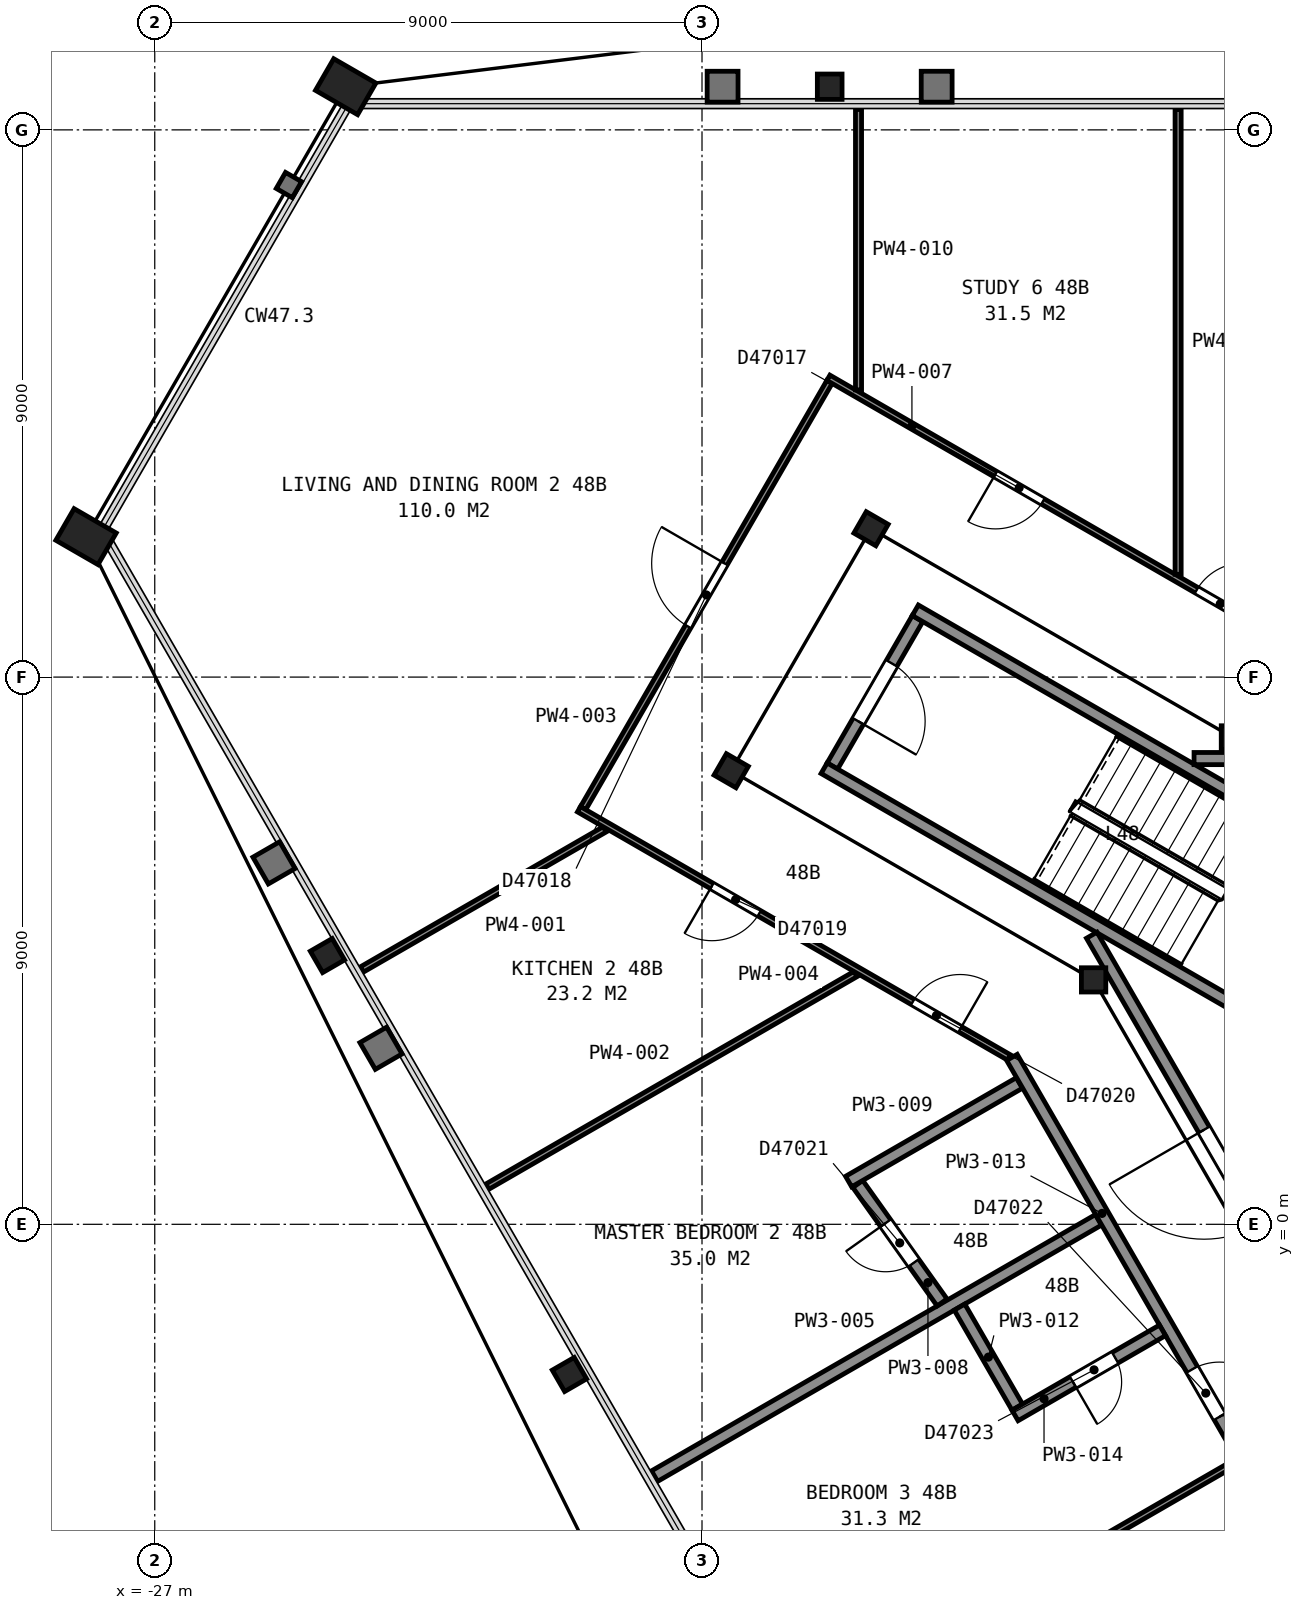
"""IFC4 building model, lengths in metres.
Left out: names, types, materials, properties, quantities, classifications, styles, units other than length and angle.
Written with IfcOpenShell. Run it as: python <this file> out.ifc"""

import sys

from ifc_helpers import new_model, si_unit, direction, frame, frame_2d, origin, origin_2d, place, context, subcontext, project, spatial, rectangle, hollow_rectangle, i_section, extrude, element, fill, save


model = new_model("IFC4")
c1 = context("Model", 3, precision=1e-05, world=origin(), true_north=direction((0.0, 1.0)))
c2 = subcontext(c1, "Body", "Model", "MODEL_VIEW")
j1 = project(units=[si_unit("LENGTHUNIT", "METRE"), si_unit("PLANEANGLEUNIT", "RADIAN")], contexts=[c1])
p1 = place(None, origin())
s1 = spatial("IfcSite", under=j1, at=p1, CompositionType="ELEMENT")
p2 = place(p1, origin())
s2 = spatial("IfcBuilding", under=s1, at=p2, CompositionType="ELEMENT")
p3 = place(p2, frame((0.0, 0.0, 193.2)))
s3 = spatial("IfcBuildingStorey", under=s2, at=p3, CompositionType="ELEMENT", Elevation=193.2)
p4 = place(p3, frame((-15.9, 18.71, 0.0), z_axis=(0.0, 0.0, 1.0), x_axis=(1.0, 0.0, 0.0)))
e1 = element("IfcColumn", 1, at=p4, inside=s3, PredefinedType="COLUMN", context=c2, shape_type="SweptSolid", body=[
    extrude(i_section(OverallWidth=0.406, OverallDepth=0.417, WebThickness=0.03, FlangeThickness=0.048, FilletRadius=0.015, at=origin_2d()), origin(), (0.0, 0.0, 1.0), 3.7),
])
for number, where, z_axis, x_axis in (
    (2, (-23.86, 18.71, 0.0), (0.0, 0.0, 1.0), (0.5, 0.866, 0.0)),
    (3, (-28.13, 11.31, 0.0), (0.0, 0.0, 1.0), (0.5, 0.866, 0.0)),
):
    element("IfcColumn", number, at=place(p3, frame(where, z_axis=z_axis, x_axis=x_axis)), inside=s3, PredefinedType="COLUMN", context=c2, shape_type="SweptSolid", body=[
        extrude(hollow_rectangle(XDim=0.6, YDim=0.8, WallThickness=0.05, at=origin_2d()), origin(), (0.0, 0.0, 1.0), 3.7),
    ])
for number, where, z_axis, x_axis in (
    (4, (-24.16, 4.42, 0.0), (0.0, 0.0, 1.0), (-0.5, 0.866, 0.0)),
    (5, (-20.18, -2.47, 0.0), (0.0, 0.0, 1.0), (-0.5, 0.866, 0.0)),
):
    element("IfcColumn", number, at=place(p3, frame(where, z_axis=z_axis, x_axis=x_axis)), inside=s3, PredefinedType="COLUMN", context=c2, shape_type="SweptSolid", body=[
        extrude(i_section(OverallWidth=0.406, OverallDepth=0.417, WebThickness=0.03, FlangeThickness=0.048, FilletRadius=0.015, at=origin_2d()), origin(), (0.0, 0.0, 1.0), 3.7),
    ])
p5 = place(p3, frame((-9.26, 8.0, 0.0), z_axis=(0.0, 0.0, 1.0), x_axis=(1.0, 0.0, 0.0)))
e6 = element("IfcColumn", 6, at=p5, inside=s3, PredefinedType="COLUMN", context=c2, shape_type="SweptSolid", body=[
    extrude(i_section(OverallWidth=0.401, OverallDepth=0.399, WebThickness=0.025, FlangeThickness=0.04, FilletRadius=0.015, at=origin_2d()), origin(), (0.0, 0.0, 1.0), 3.7),
])
for number, where, z_axis, x_axis in (
    (7, (-15.22, 11.44, 0.0), (0.0, 0.0, 1.0), (0.5, 0.866, 0.0)),
    (8, (-17.52, 7.46, 0.0), (0.0, 0.0, 1.0), (0.5, 0.866, 0.0)),
):
    element("IfcColumn", number, at=place(p3, frame(where, z_axis=z_axis, x_axis=x_axis)), inside=s3, PredefinedType="COLUMN", context=c2, shape_type="SweptSolid", body=[
        extrude(i_section(OverallWidth=0.406, OverallDepth=0.417, WebThickness=0.03, FlangeThickness=0.048, FilletRadius=0.015, at=origin_2d()), origin(), (0.0, 0.0, 1.0), 3.7),
    ])
p6 = place(p3, frame((-11.56, 4.02, 0.0), z_axis=(0.0, 0.0, 1.0), x_axis=(1.0, 0.0, 0.0)))
e9 = element("IfcColumn", 9, at=p6, inside=s3, PredefinedType="COLUMN", context=c2, shape_type="SweptSolid", body=[
    extrude(i_section(OverallWidth=0.401, OverallDepth=0.399, WebThickness=0.025, FlangeThickness=0.04, FilletRadius=0.015, at=origin_2d()), origin(), (0.0, 0.0, 1.0), 3.7),
])
p7 = place(p3, frame((-14.455, 9.962, 0.0), z_axis=(0.0, 0.0, 1.0), x_axis=(-0.500049511043, -0.865996816683, 0.0)))
e10 = element("IfcWall", 10, at=p7, inside=s3, PredefinedType="PARTITIONING", context=c2, shape_type="SweptSolid", body=[
    extrude(rectangle(XDim=2.8, YDim=0.2, at=frame_2d((1.4, 0.0))), origin(), (0.0, 0.0, 1.0), 3.45),
])
p8 = place(p7, frame((0.85, 0.0, 0.0)))
e11 = element("IfcOpeningElement", 11, at=p8, cuts=e10, PredefinedType="OPENING", context=c2, shape_type="SweptSolid", body=[
    extrude(rectangle(XDim=1.1, YDim=2.1, at=frame_2d((0.55, 1.05))), frame((0.0, 0.11, 0.0), z_axis=(0.0, -1.0, 0.0), x_axis=(1.0, 0.0, 0.0)), (0.0, 0.0, 1.0), 0.22),
])
for number, where, z_axis, x_axis in (
    (12, (-7.678, 2.701, 0.0), (0.0, 0.0, 1.0), (-0.866, 0.5, 0.0)),
    (13, (-6.178, 5.299, 0.0), (0.0, 0.0, 1.0), (-0.866, 0.5, 0.0)),
):
    element("IfcWall", number, at=place(p3, frame(where, z_axis=z_axis, x_axis=x_axis)), inside=s3, PredefinedType="PARTITIONING", context=c2, shape_type="SweptSolid", body=[
        extrude(rectangle(XDim=9.6, YDim=0.2, at=frame_2d((4.8, 0.0))), origin(), (0.0, 0.0, 1.0), 3.45),
    ])
p9 = place(p3, frame((-11.591, 4.755, 0.0), z_axis=(0.0, 0.0, 1.0), x_axis=(0.500043977787, -0.866000011708, 0.0)))
e14 = element("IfcWall", 14, at=p9, inside=s3, PredefinedType="PARTITIONING", context=c2, shape_type="SweptSolid", body=[
    extrude(rectangle(XDim=6.617, YDim=0.2, at=frame_2d((3.308, 0.0))), origin(), (0.0, 0.0, 1.0), 3.45),
])
p10 = place(p9, frame((3.695, 0.0, 0.0)))
e15 = element("IfcOpeningElement", 15, at=p10, cuts=e14, PredefinedType="OPENING", context=c2, shape_type="SweptSolid", body=[
    extrude(rectangle(XDim=1.8, YDim=2.1, at=frame_2d((0.9, 1.05))), frame((0.0, 0.11, 0.0), z_axis=(0.0, -1.0, 0.0), x_axis=(1.0, 0.0, 0.0)), (0.0, 0.0, 1.0), 0.22),
])
p11 = place(p3, frame((-9.908, 7.66, 0.0), z_axis=(0.0, 0.0, 1.0), x_axis=(1.0, 0.0, 0.0)))
e16 = element("IfcWall", 16, at=p11, inside=s3, PredefinedType="PARTITIONING", context=c2, shape_type="SweptSolid", body=[
    extrude(rectangle(XDim=3.621, YDim=0.2, at=frame_2d((1.811, 0.0))), origin(), (0.0, 0.0, 1.0), 3.45),
])
p12 = place(p3, frame((-23.592, 4.192, 0.0), z_axis=(0.0, 0.0, 1.0), x_axis=(0.866056775574, 0.499945658529, 0.0)))
e17 = element("IfcWall", 17, at=p12, inside=s3, PredefinedType="PARTITIONING", context=c2, shape_type="SweptSolid", body=[
    extrude(rectangle(XDim=4.608, YDim=0.1, at=frame_2d((2.304, 0.0))), origin(), (0.0, 0.0, 1.0), 2.713),
])
p13 = place(p3, frame((-21.53, 0.62, 0.0), z_axis=(0.0, 0.0, 1.0), x_axis=(0.865986079307, 0.500068105808, 0.0)))
e18 = element("IfcWall", 18, at=p13, inside=s3, PredefinedType="PARTITIONING", context=c2, shape_type="SweptSolid", body=[
    extrude(rectangle(XDim=6.99, YDim=0.1, at=frame_2d((3.495, 0.0))), origin(), (0.0, 0.0, 1.0), 2.713),
])
p14 = place(p3, frame((-19.955, 6.844, 0.0), z_axis=(0.0, 0.0, 1.0), x_axis=(0.500415732313, 0.865785247537, 0.0)))
e19 = element("IfcWall", 19, at=p14, inside=s3, PredefinedType="PARTITIONING", context=c2, shape_type="SweptSolid", body=[
    extrude(rectangle(XDim=8.097, YDim=0.1, at=frame_2d((4.049, 0.0))), origin(), (0.0, 0.0, 1.0), 2.713),
])
p15 = place(p14, frame((3.45, 0.0, 0.0)))
e20 = element("IfcOpeningElement", 20, at=p15, cuts=e19, PredefinedType="OPENING", context=c2, shape_type="SweptSolid", body=[
    extrude(rectangle(XDim=1.2, YDim=2.1, at=frame_2d((0.6, 1.05))), frame((0.0, 0.06, 0.0), z_axis=(0.0, -1.0, 0.0), x_axis=(1.0, 0.0, 0.0)), (0.0, 0.0, 1.0), 0.12),
])
p16 = place(p3, frame((-12.952, 2.744, 0.0), z_axis=(0.0, 0.0, 1.0), x_axis=(-0.86608949446, 0.499888975259, 0.0)))
e21 = element("IfcWall", 21, at=p16, inside=s3, PredefinedType="PARTITIONING", context=c2, shape_type="SweptSolid", body=[
    extrude(rectangle(XDim=8.165, YDim=0.1, at=frame_2d((4.083, 0.0))), origin(), (0.0, 0.0, 1.0), 2.713),
])
p17 = place(p16, frame((4.741, 0.0, 0.0)))
e22 = element("IfcOpeningElement", 22, at=p17, cuts=e21, PredefinedType="OPENING", context=c2, shape_type="SweptSolid", body=[
    extrude(rectangle(XDim=0.9, YDim=2.1, at=frame_2d((0.45, 1.05))), frame((0.0, 0.06, 0.0), z_axis=(0.0, -1.0, 0.0), x_axis=(1.0, 0.0, 0.0)), (0.0, 0.0, 1.0), 0.12),
])
p18 = place(p16, frame((0.928, 0.0, 0.0)))
e23 = element("IfcOpeningElement", 23, at=p18, cuts=e21, PredefinedType="OPENING", context=c2, shape_type="SweptSolid", body=[
    extrude(rectangle(XDim=0.9, YDim=2.1, at=frame_2d((0.45, 1.05))), frame((0.0, 0.06, 0.0), z_axis=(0.0, -1.0, 0.0), x_axis=(1.0, 0.0, 0.0)), (0.0, 0.0, 1.0), 0.12),
])
p19 = place(p3, frame((-18.78, -4.142, 0.0), z_axis=(0.0, 0.0, 1.0), x_axis=(0.866020616849, 0.500008291124, 0.0)))
e24 = element("IfcWall", 24, at=p19, inside=s3, PredefinedType="PARTITIONING", context=c2, shape_type="SweptSolid", body=[
    extrude(rectangle(XDim=8.428, YDim=0.2, at=frame_2d((4.214, 0.0))), origin(), (0.0, 0.0, 1.0), 2.713),
])
p20 = place(p3, frame((-16.489, -8.11, 0.0), z_axis=(0.0, 0.0, 1.0), x_axis=(0.865995531057, 0.500051737513, 0.0)))
e25 = element("IfcWall", 25, at=p20, inside=s3, PredefinedType="PARTITIONING", context=c2, shape_type="SweptSolid", body=[
    extrude(rectangle(XDim=8.429, YDim=0.1, at=frame_2d((4.214, 0.0))), origin(), (0.0, 0.0, 1.0), 2.713),
])
p21 = place(p3, frame((-15.921, 13.923, 0.0), z_axis=(0.0, 0.0, 1.0), x_axis=(0.866088973199, -0.499889878377, 0.0)))
e26 = element("IfcWall", 26, at=p21, inside=s3, PredefinedType="PARTITIONING", context=c2, shape_type="SweptSolid", body=[
    extrude(rectangle(XDim=8.163, YDim=0.1, at=frame_2d((4.082, 0.0))), origin(), (0.0, 0.0, 1.0), 2.713),
])
p22 = place(p21, frame((6.99, 0.0, 0.0)))
e27 = element("IfcOpeningElement", 27, at=p22, cuts=e26, PredefinedType="OPENING", context=c2, shape_type="SweptSolid", body=[
    extrude(rectangle(XDim=0.9, YDim=2.1, at=frame_2d((0.45, 1.05))), frame((0.0, 0.06, 0.0), z_axis=(0.0, -1.0, 0.0), x_axis=(1.0, 0.0, 0.0)), (0.0, 0.0, 1.0), 0.12),
])
p23 = place(p21, frame((3.172, 0.0, 0.0)))
e28 = element("IfcOpeningElement", 28, at=p23, cuts=e26, PredefinedType="OPENING", context=c2, shape_type="SweptSolid", body=[
    extrude(rectangle(XDim=0.9, YDim=2.1, at=frame_2d((0.45, 1.05))), frame((0.0, 0.06, 0.0), z_axis=(0.0, -1.0, 0.0), x_axis=(1.0, 0.0, 0.0)), (0.0, 0.0, 1.0), 0.12),
])
p24 = place(p3, frame((-15.438, 0.663, 0.0), z_axis=(0.0, 0.0, 1.0), x_axis=(0.579721135961, -0.81481495109, 0.0)))
e29 = element("IfcWall", 29, at=p24, inside=s3, PredefinedType="PARTITIONING", context=c2, shape_type="SweptSolid", body=[
    extrude(rectangle(XDim=2.392, YDim=0.2, at=frame_2d((1.196, 0.0))), origin(), (0.0, 0.0, 1.0), 2.713),
])
p25 = place(p24, frame((0.79, 0.0, 0.0)))
e30 = element("IfcOpeningElement", 30, at=p25, cuts=e29, PredefinedType="OPENING", context=c2, shape_type="SweptSolid", body=[
    extrude(rectangle(XDim=0.8, YDim=2.1, at=frame_2d((0.4, 1.05))), frame((0.0, 0.11, 0.0), z_axis=(0.0, -1.0, 0.0), x_axis=(1.0, 0.0, 0.0)), (0.0, 0.0, 1.0), 0.22),
])
p26 = place(p3, frame((-15.589, 0.703, 0.0), z_axis=(0.0, 0.0, 1.0), x_axis=(0.86594479446, 0.500139593461, 0.0)))
e31 = element("IfcWall", 31, at=p26, inside=s3, PredefinedType="PARTITIONING", context=c2, shape_type="SweptSolid", body=[
    extrude(rectangle(XDim=3.242, YDim=0.2, at=frame_2d((1.621, 0.0))), origin(), (0.0, 0.0, 1.0), 2.713),
])
p27 = place(p3, frame((-15.426, 13.724, 0.0), z_axis=(0.0, 0.0, 1.0), x_axis=(0.0, 1.0, 0.0)))
e32 = element("IfcWall", 32, at=p27, inside=s3, PredefinedType="PARTITIONING", context=c2, shape_type="SweptSolid", body=[
    extrude(rectangle(XDim=4.611, YDim=0.1, at=frame_2d((2.306, 0.0))), origin(), (0.0, 0.0, 1.0), 2.713),
])
p28 = place(p3, frame((-13.765, -1.362, 0.0), z_axis=(0.0, 0.0, 1.0), x_axis=(0.499911523785, -0.866076479525, 0.0)))
e33 = element("IfcWall", 33, at=p28, inside=s3, PredefinedType="PARTITIONING", context=c2, shape_type="SweptSolid", body=[
    extrude(rectangle(XDim=1.9, YDim=0.2, at=frame_2d((0.95, 0.0))), origin(), (0.0, 0.0, 1.0), 2.713),
])
p29 = place(p3, frame((-4.075, -12.545, 0.0), z_axis=(0.0, 0.0, 1.0), x_axis=(-0.499999743747, 0.866025551732, 0.0)))
e34 = element("IfcWall", 34, at=p29, inside=s3, PredefinedType="PARTITIONING", context=c2, shape_type="SweptSolid", body=[
    extrude(rectangle(XDim=17.656, YDim=0.2, at=frame_2d((8.828, 0.0))), origin(), (0.0, 0.0, 1.0), 2.713),
])
p30 = place(p29, frame((10.83, 0.0, 0.0)))
e35 = element("IfcOpeningElement", 35, at=p30, cuts=e34, PredefinedType="OPENING", context=c2, shape_type="SweptSolid", body=[
    extrude(rectangle(XDim=0.9, YDim=2.1, at=frame_2d((0.45, 1.05))), frame((0.0, 0.11, 0.0), z_axis=(0.0, -1.0, 0.0), x_axis=(1.0, 0.0, 0.0)), (0.0, 0.0, 1.0), 0.22),
])
p31 = place(p29, frame((7.148, 0.0, 0.0)))
e36 = element("IfcOpeningElement", 36, at=p31, cuts=e34, PredefinedType="OPENING", context=c2, shape_type="SweptSolid", body=[
    extrude(rectangle(XDim=0.9, YDim=2.1, at=frame_2d((0.45, 1.05))), frame((0.0, 0.11, 0.0), z_axis=(0.0, -1.0, 0.0), x_axis=(1.0, 0.0, 0.0)), (0.0, 0.0, 1.0), 0.22),
])
p32 = place(p29, frame((2.198, 0.0, 0.0)))
e37 = element("IfcOpeningElement", 37, at=p32, cuts=e34, PredefinedType="OPENING", context=c2, shape_type="SweptSolid", body=[
    extrude(rectangle(XDim=0.9, YDim=2.1, at=frame_2d((0.45, 1.05))), frame((0.0, 0.11, 0.0), z_axis=(0.0, -1.0, 0.0), x_axis=(1.0, 0.0, 0.0)), (0.0, 0.0, 1.0), 0.22),
])
p33 = place(p3, frame((-12.852, -3.144, 0.0), z_axis=(0.0, 0.0, 1.0), x_axis=(0.866018616679, 0.500011755427, 0.0)))
e38 = element("IfcWall", 38, at=p33, inside=s3, PredefinedType="PARTITIONING", context=c2, shape_type="SweptSolid", body=[
    extrude(rectangle(XDim=2.8, YDim=0.2, at=frame_2d((1.4, 0.0))), origin(), (0.0, 0.0, 1.0), 2.713),
])
p34 = place(p33, frame((1.1, 0.0, 0.0)))
e39 = element("IfcOpeningElement", 39, at=p34, cuts=e38, PredefinedType="OPENING", context=c2, shape_type="SweptSolid", body=[
    extrude(rectangle(XDim=0.8, YDim=2.1, at=frame_2d((0.4, 1.05))), frame((0.0, 0.11, 0.0), z_axis=(0.0, -1.0, 0.0), x_axis=(1.0, 0.0, 0.0)), (0.0, 0.0, 1.0), 0.22),
])
p35 = place(p3, frame((-10.17, 10.691, 0.0), z_axis=(0.0, 0.0, 1.0), x_axis=(0.0, 1.0, 0.0)))
e40 = element("IfcWall", 40, at=p35, inside=s3, PredefinedType="PARTITIONING", context=c2, shape_type="SweptSolid", body=[
    extrude(rectangle(XDim=7.644, YDim=0.1, at=frame_2d((3.822, 0.0))), origin(), (0.0, 0.0, 1.0), 2.713),
])
p36 = place(p8, origin())
e41 = element("IfcDoor", 41, at=p36, inside=s3, OperationType="SINGLE_SWING_RIGHT", PredefinedType="DOOR", context=c2, shape_type="SweptSolid", body=[
    extrude(rectangle(XDim=1.1, YDim=2.1, at=frame_2d((0.55, 1.05))), frame((0.0, 0.025, 0.0), z_axis=(0.0, -1.0, 0.0), x_axis=(1.0, 0.0, 0.0)), (0.0, 0.0, 1.0), 0.05),
])
fill(e11, e41)
p37 = place(p10, origin())
e42 = element("IfcDoor", 42, at=p37, inside=s3, OperationType="DOUBLE_DOOR_SINGLE_SWING", PredefinedType="DOOR", context=c2, shape_type="SweptSolid", body=[
    extrude(rectangle(XDim=1.8, YDim=2.1, at=frame_2d((0.9, 1.05))), frame((0.0, 0.025, 0.0), z_axis=(0.0, -1.0, 0.0), x_axis=(1.0, 0.0, 0.0)), (0.0, 0.0, 1.0), 0.05),
])
fill(e15, e42)
p38 = place(p15, origin())
e43 = element("IfcDoor", 43, at=p38, inside=s3, OperationType="SINGLE_SWING_RIGHT", PredefinedType="DOOR", context=c2, shape_type="SweptSolid", body=[
    extrude(rectangle(XDim=1.2, YDim=2.1, at=frame_2d((0.6, 1.05))), frame((0.0, 0.025, 0.0), z_axis=(0.0, -1.0, 0.0), x_axis=(1.0, 0.0, 0.0)), (0.0, 0.0, 1.0), 0.05),
])
fill(e20, e43)
p39 = place(p17, origin())
e44 = element("IfcDoor", 44, at=p39, inside=s3, OperationType="SINGLE_SWING_RIGHT", PredefinedType="DOOR", context=c2, shape_type="SweptSolid", body=[
    extrude(rectangle(XDim=0.9, YDim=2.1, at=frame_2d((0.45, 1.05))), frame((0.0, 0.025, 0.0), z_axis=(0.0, -1.0, 0.0), x_axis=(1.0, 0.0, 0.0)), (0.0, 0.0, 1.0), 0.05),
])
fill(e22, e44)
p40 = place(p18, origin())
e45 = element("IfcDoor", 45, at=p40, inside=s3, OperationType="SINGLE_SWING_LEFT", PredefinedType="DOOR", context=c2, shape_type="SweptSolid", body=[
    extrude(rectangle(XDim=0.9, YDim=2.1, at=frame_2d((0.45, 1.05))), frame((0.0, 0.025, 0.0), z_axis=(0.0, -1.0, 0.0), x_axis=(1.0, 0.0, 0.0)), (0.0, 0.0, 1.0), 0.05),
])
fill(e23, e45)
p41 = place(p22, origin())
e46 = element("IfcDoor", 46, at=p41, inside=s3, OperationType="SINGLE_SWING_RIGHT", PredefinedType="DOOR", context=c2, shape_type="SweptSolid", body=[
    extrude(rectangle(XDim=0.9, YDim=2.1, at=frame_2d((0.45, 1.05))), frame((0.0, 0.025, 0.0), z_axis=(0.0, -1.0, 0.0), x_axis=(1.0, 0.0, 0.0)), (0.0, 0.0, 1.0), 0.05),
])
fill(e27, e46)
p42 = place(p23, origin())
e47 = element("IfcDoor", 47, at=p42, inside=s3, OperationType="SINGLE_SWING_LEFT", PredefinedType="DOOR", context=c2, shape_type="SweptSolid", body=[
    extrude(rectangle(XDim=0.9, YDim=2.1, at=frame_2d((0.45, 1.05))), frame((0.0, 0.025, 0.0), z_axis=(0.0, -1.0, 0.0), x_axis=(1.0, 0.0, 0.0)), (0.0, 0.0, 1.0), 0.05),
])
fill(e28, e47)
p43 = place(p25, origin())
e48 = element("IfcDoor", 48, at=p43, inside=s3, OperationType="SINGLE_SWING_LEFT", PredefinedType="DOOR", context=c2, shape_type="SweptSolid", body=[
    extrude(rectangle(XDim=0.8, YDim=2.1, at=frame_2d((0.4, 1.05))), frame((0.0, 0.025, 0.0), z_axis=(0.0, -1.0, 0.0), x_axis=(1.0, 0.0, 0.0)), (0.0, 0.0, 1.0), 0.05),
])
fill(e30, e48)
p44 = place(p30, origin())
e49 = element("IfcDoor", 49, at=p44, inside=s3, OperationType="SINGLE_SWING_LEFT", PredefinedType="DOOR", context=c2, shape_type="SweptSolid", body=[
    extrude(rectangle(XDim=0.9, YDim=2.1, at=frame_2d((0.45, 1.05))), frame((0.0, 0.025, 0.0), z_axis=(0.0, -1.0, 0.0), x_axis=(1.0, 0.0, 0.0)), (0.0, 0.0, 1.0), 0.05),
])
fill(e35, e49)
p45 = place(p34, origin())
e50 = element("IfcDoor", 50, at=p45, inside=s3, OperationType="SINGLE_SWING_LEFT", PredefinedType="DOOR", context=c2, shape_type="SweptSolid", body=[
    extrude(rectangle(XDim=0.8, YDim=2.1, at=frame_2d((0.4, 1.05))), frame((0.0, 0.025, 0.0), z_axis=(0.0, -1.0, 0.0), x_axis=(1.0, 0.0, 0.0)), (0.0, 0.0, 1.0), 0.05),
])
fill(e39, e50)
save(model, sys.argv[1])
